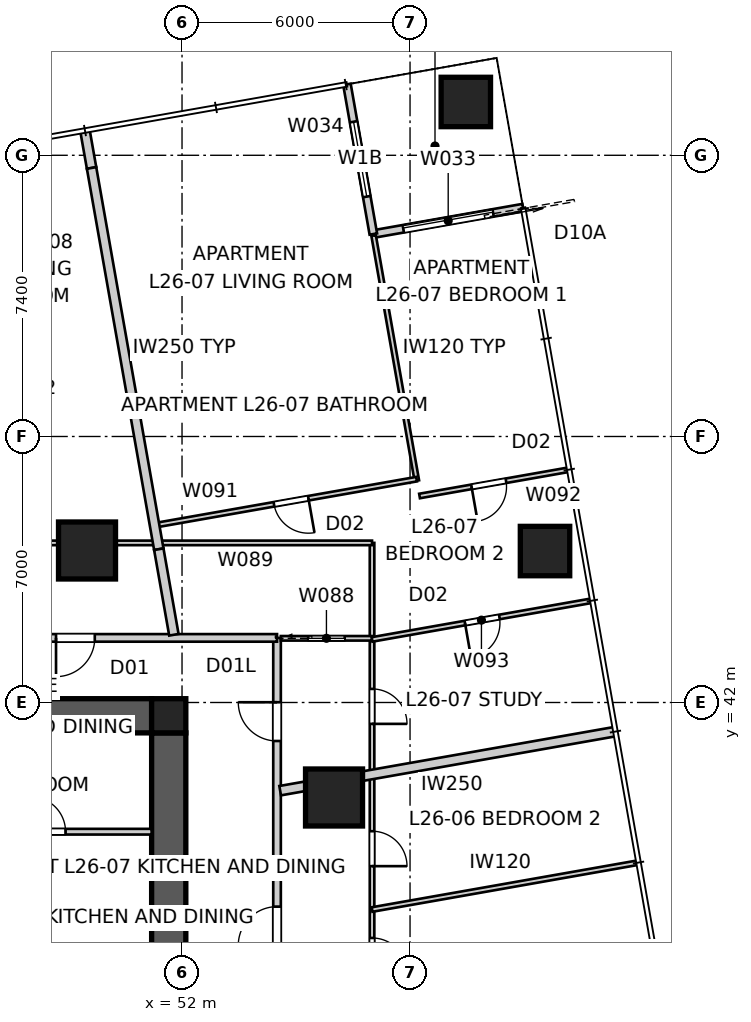
"""IFC4 building model, lengths in metres.
Left out: names, types, materials, properties, quantities, classifications, styles, units other than length and angle.
Written with IfcOpenShell. Run it as: python <this file> out.ifc"""

import sys

from ifc_helpers import new_model, si_unit, direction, frame, frame_2d, origin, origin_2d, place, context, subcontext, project, spatial, polyline, rectangle, outline, extrude, element, fill, save


model = new_model("IFC4")
c1 = context("Model", 3, precision=1e-05, world=origin(), true_north=direction((0.0, 1.0)))
c2 = subcontext(c1, "Body", "Model", "MODEL_VIEW")
j1 = project(units=[si_unit("LENGTHUNIT", "METRE"), si_unit("PLANEANGLEUNIT", "RADIAN")], contexts=[c1])
p1 = place(None, origin())
s1 = spatial("IfcSite", under=j1, at=p1, CompositionType="ELEMENT")
p2 = place(p1, origin())
s2 = spatial("IfcBuilding", under=s1, at=p2, CompositionType="ELEMENT")
p3 = place(p2, frame((0.0, 0.0, 96.4)))
s3 = spatial("IfcBuildingStorey", under=s2, at=p3, CompositionType="ELEMENT", Elevation=96.4)
p4 = place(p3, frame((28.8, 41.65, 0.0), z_axis=(0.0, 0.0, 1.0), x_axis=(1.0, 0.0, 0.0)))
e1 = element("IfcWall", 1, at=p4, inside=s3, PredefinedType="SHEAR", context=c2, shape_type="SweptSolid", body=[
    extrude(outline(polyline([(0.0, -0.45), (22.4, -0.45), (22.4, -0.025), (22.85, -0.025), (22.85, 0.025), (22.4, 0.025), (22.4, 0.45), (0.0, 0.45), (0.0, 0.025), (-0.45, 0.025), (-0.45, -0.025), (0.0, -0.025), (0.0, -0.45)])), origin(), (0.0, 0.0, 1.0), 3.4),
])
p5 = place(p3, frame((51.65, 18.8, 0.0), z_axis=(0.0, 0.0, 1.0), x_axis=(0.0, 1.0, 0.0)))
e2 = element("IfcWall", 2, at=p5, inside=s3, PredefinedType="SHEAR", context=c2, shape_type="SweptSolid", body=[
    extrude(outline(polyline([(0.0, -0.45), (22.4, -0.45), (22.4, -0.025), (22.85, -0.025), (22.85, 0.025), (22.4, 0.025), (22.4, 0.45), (0.0, 0.45), (0.0, 0.025), (-0.45, 0.025), (-0.45, -0.025), (0.0, -0.025), (0.0, -0.45)])), origin(), (0.0, 0.0, 1.0), 3.4),
])
p6 = place(p5, frame((11.14, 0.0, 0.0)))
e3 = element("IfcOpeningElement", 3, at=p6, cuts=e2, PredefinedType="OPENING", context=c2, shape_type="SweptSolid", body=[
    extrude(rectangle(XDim=1.02, YDim=2.4, at=frame_2d((0.51, 1.2))), frame((0.0, 0.46, 0.0), z_axis=(0.0, -1.0, 0.0), x_axis=(1.0, 0.0, 0.0)), (0.0, 0.0, 1.0), 0.92),
])
p7 = place(p3, frame((51.65, 41.65, 0.0), z_axis=(0.0, 0.0, 1.0), x_axis=(1.0, 0.0, 0.0)))
e4 = element("IfcColumn", 4, at=p7, inside=s3, PredefinedType="COLUMN", context=c2, shape_type="SweptSolid", body=[
    extrude(rectangle(XDim=0.9, YDim=0.9, at=origin_2d()), origin(), (0.0, 0.0, 1.0), 3.4),
])
for number, where, z_axis, x_axis in (
    (5, (61.552, 45.985, 0.0), (0.0, 0.0, 1.0), (1.0, 0.0, 0.0)),
    (6, (59.468, 57.803, 0.0), (0.0, 0.0, 1.0), (1.0, 0.0, 0.0)),
):
    element("IfcColumn", number, at=place(p3, frame(where, z_axis=z_axis, x_axis=x_axis)), inside=s3, PredefinedType="COLUMN", context=c2, shape_type="SweptSolid", body=[
        extrude(rectangle(XDim=1.3, YDim=1.3, at=origin_2d()), origin(), (0.0, 0.0, 1.0), 3.4),
    ])
for number, where, z_axis, x_axis in (
    (7, (56.0, 39.5, 0.0), (0.0, 0.0, 1.0), (1.0, 0.0, 0.0)),
    (8, (49.5, 46.0, 0.0), (0.0, 0.0, 1.0), (1.0, 0.0, 0.0)),
):
    element("IfcColumn", number, at=place(p3, frame(where, z_axis=z_axis, x_axis=x_axis)), inside=s3, PredefinedType="COLUMN", context=c2, shape_type="SweptSolid", body=[
        extrude(rectangle(XDim=1.5, YDim=1.5, at=origin_2d()), origin(), (0.0, 0.0, 1.0), 3.4),
    ])
p8 = place(p3, frame((60.974, 55.022, 0.0), z_axis=(0.0, 0.0, 1.0), x_axis=(-0.984808127031, -0.173646056486, 0.0)))
e9 = element("IfcWall", 9, at=p8, inside=s3, PredefinedType="SOLIDWALL", context=c2, shape_type="SweptSolid", body=[
    extrude(rectangle(XDim=4.0, YDim=0.2, at=frame_2d((2.0, 0.0))), origin(), (0.0, 0.0, 1.0), 3.25),
])
p9 = place(p8, frame((0.8, 0.0, 0.0)))
e10 = element("IfcOpeningElement", 10, at=p9, cuts=e9, PredefinedType="OPENING", context=c2, shape_type="SweptSolid", body=[
    extrude(rectangle(XDim=2.4, YDim=2.1, at=frame_2d((1.2, 1.05))), frame((0.0, 0.11, 0.0), z_axis=(0.0, -1.0, 0.0), x_axis=(1.0, 0.0, 0.0)), (0.0, 0.0, 1.0), 0.22),
])
p10 = place(p3, frame((57.034, 54.328, 0.0), z_axis=(0.0, 0.0, 1.0), x_axis=(-0.173646056486, 0.984808127031, 0.0)))
e11 = element("IfcWall", 11, at=p10, inside=s3, PredefinedType="SOLIDWALL", context=c2, shape_type="SweptSolid", body=[
    extrude(rectangle(XDim=4.0, YDim=0.2, at=frame_2d((2.0, 0.0))), origin(), (0.0, 0.0, 1.0), 3.25),
])
p11 = place(p10, frame((1.0, 0.0, 0.45)))
e12 = element("IfcOpeningElement", 12, at=p11, cuts=e11, PredefinedType="OPENING", context=c2, shape_type="SweptSolid", body=[
    extrude(rectangle(XDim=2.0, YDim=1.8, at=frame_2d((1.0, 0.9))), frame((0.0, 0.11, 0.0), z_axis=(0.0, -1.0, 0.0), x_axis=(1.0, 0.0, 0.0)), (0.0, 0.0, 1.0), 0.22),
])
p12 = place(p3, frame((54.5, 16.3, 0.0), z_axis=(0.0, 0.0, 1.0), x_axis=(0.0, 1.0, 0.0)))
e13 = element("IfcWall", 13, at=p12, inside=s3, PredefinedType="PARTITIONING", context=c2, shape_type="SweptSolid", body=[
    extrude(rectangle(XDim=27.4, YDim=0.2, at=frame_2d((13.7, 0.0))), origin(), (0.0, 0.0, 1.0), 3.25),
])
p13 = place(p12, frame((19.308, 0.0, 0.0)))
e14 = element("IfcOpeningElement", 14, at=p13, cuts=e13, PredefinedType="OPENING", context=c2, shape_type="SweptSolid", body=[
    extrude(rectangle(XDim=1.02, YDim=2.34, at=frame_2d((0.51, 1.17))), frame((0.0, 0.11, 0.0), z_axis=(0.0, -1.0, 0.0), x_axis=(1.0, 0.0, 0.0)), (0.0, 0.0, 1.0), 0.22),
])
p14 = place(p12, frame((24.687, 0.0, 0.0)))
e15 = element("IfcOpeningElement", 15, at=p14, cuts=e13, PredefinedType="OPENING", context=c2, shape_type="SweptSolid", body=[
    extrude(rectangle(XDim=1.02, YDim=2.1, at=frame_2d((0.51, 1.05))), frame((0.0, 0.11, 0.0), z_axis=(0.0, -1.0, 0.0), x_axis=(1.0, 0.0, 0.0)), (0.0, 0.0, 1.0), 0.22),
])
p15 = place(p12, frame((1.622, 0.0, 0.0)))
e16 = element("IfcOpeningElement", 16, at=p15, cuts=e13, PredefinedType="OPENING", context=c2, shape_type="SweptSolid", body=[
    extrude(rectangle(XDim=1.02, YDim=2.1, at=frame_2d((0.51, 1.05))), frame((0.0, 0.11, 0.0), z_axis=(0.0, -1.0, 0.0), x_axis=(1.0, 0.0, 0.0)), (0.0, 0.0, 1.0), 0.22),
])
p16 = place(p3, frame((54.5, 43.7, 0.0), z_axis=(0.0, 0.0, 1.0), x_axis=(-1.0, 0.0, 0.0)))
e17 = element("IfcWall", 17, at=p16, inside=s3, PredefinedType="PARTITIONING", context=c2, shape_type="SweptSolid", body=[
    extrude(rectangle(XDim=29.0, YDim=0.2, at=frame_2d((14.5, 0.0))), origin(), (0.0, 0.0, 1.0), 3.25),
])
p17 = place(p16, frame((11.951, 0.0, 0.0)))
e18 = element("IfcOpeningElement", 18, at=p17, cuts=e17, PredefinedType="OPENING", context=c2, shape_type="SweptSolid", body=[
    extrude(rectangle(XDim=1.02, YDim=2.34, at=frame_2d((0.51, 1.17))), frame((0.0, 0.11, 0.0), z_axis=(0.0, -1.0, 0.0), x_axis=(1.0, 0.0, 0.0)), (0.0, 0.0, 1.0), 0.22),
])
p18 = place(p16, frame((4.795, 0.0, 0.0)))
e19 = element("IfcOpeningElement", 19, at=p18, cuts=e17, PredefinedType="OPENING", context=c2, shape_type="SweptSolid", body=[
    extrude(rectangle(XDim=1.02, YDim=2.34, at=frame_2d((0.51, 1.17))), frame((0.0, 0.11, 0.0), z_axis=(0.0, -1.0, 0.0), x_axis=(1.0, 0.0, 0.0)), (0.0, 0.0, 1.0), 0.22),
])
p19 = place(p3, frame((63.405, 41.235, 0.0), z_axis=(0.0, 0.0, 1.0), x_axis=(-0.984806596137, -0.173654738504, 0.0)))
e20 = element("IfcWall", 20, at=p19, inside=s3, PredefinedType="PARTITIONING", context=c2, shape_type="SweptSolid", body=[
    extrude(rectangle(XDim=8.958, YDim=0.25, at=frame_2d((4.479, 0.0))), origin(), (0.0, 0.0, 1.0), 3.25),
])
p20 = place(p3, frame((49.446, 57.051, 0.0), z_axis=(0.0, 0.0, 1.0), x_axis=(0.173813186416, -0.984778643263, 0.0)))
e21 = element("IfcWall", 21, at=p20, inside=s3, PredefinedType="PARTITIONING", context=c2, shape_type="SweptSolid", body=[
    extrude(rectangle(XDim=1.0, YDim=0.25, at=frame_2d((0.5, 0.0))), origin(), (0.0, 0.0, 1.0), 3.25),
])
p21 = place(p3, frame((49.62, 56.066, 0.0), z_axis=(0.0, 0.0, 1.0), x_axis=(0.173644522411, -0.984808397525, 0.0)))
e22 = element("IfcWall", 22, at=p21, inside=s3, PredefinedType="PARTITIONING", context=c2, shape_type="SweptSolid", body=[
    extrude(rectangle(XDim=10.188, YDim=0.25, at=frame_2d((5.094, 0.0))), origin(), (0.0, 0.0, 1.0), 2.638),
])
p22 = place(p3, frame((51.389, 46.033, 0.0), z_axis=(0.0, 0.0, 1.0), x_axis=(0.173657387043, -0.984806129106, 0.0)))
e23 = element("IfcWall", 23, at=p22, inside=s3, PredefinedType="PARTITIONING", context=c2, shape_type="SweptSolid", body=[
    extrude(rectangle(XDim=2.286, YDim=0.25, at=frame_2d((1.143, 0.0))), origin(), (0.0, 0.0, 1.0), 3.25),
])
p23 = place(p3, frame((45.75, 38.6, 0.0), z_axis=(0.0, 0.0, 1.0), x_axis=(1.0, 0.0, 0.0)))
e24 = element("IfcWall", 24, at=p23, inside=s3, PredefinedType="SOLIDWALL", context=c2, shape_type="SweptSolid", body=[
    extrude(rectangle(XDim=5.45, YDim=0.15, at=frame_2d((2.725, 0.0))), origin(), (0.0, 0.0, 1.0), 3.25),
])
p24 = place(p23, frame((2.265, 0.0, 0.0)))
e25 = element("IfcOpeningElement", 25, at=p24, cuts=e24, PredefinedType="OPENING", context=c2, shape_type="SweptSolid", body=[
    extrude(rectangle(XDim=0.92, YDim=2.1, at=frame_2d((0.46, 1.05))), frame((0.0, 0.085, 0.0), z_axis=(0.0, -1.0, 0.0), x_axis=(1.0, 0.0, 0.0)), (0.0, 0.0, 1.0), 0.17),
])
p25 = place(p3, frame((57.0, 46.2, 0.0), z_axis=(0.0, 0.0, 1.0), x_axis=(0.0, -1.0, 0.0)))
e26 = element("IfcWall", 26, at=p25, inside=s3, PredefinedType="PARTITIONING", context=c2, shape_type="SweptSolid", body=[
    extrude(rectangle(XDim=32.4, YDim=0.12, at=frame_2d((16.2, 0.0))), origin(), (0.0, 0.0, 1.0), 2.55),
])
p26 = place(p25, frame((10.396, 0.0, 0.0)))
e27 = element("IfcOpeningElement", 27, at=p26, cuts=e26, PredefinedType="OPENING", context=c2, shape_type="SweptSolid", body=[
    extrude(rectangle(XDim=0.92, YDim=2.34, at=frame_2d((0.46, 1.17))), frame((0.0, 0.07, 0.0), z_axis=(0.0, -1.0, 0.0), x_axis=(1.0, 0.0, 0.0)), (0.0, 0.0, 1.0), 0.14),
])
p27 = place(p25, frame((7.587, 0.0, 0.0)))
e28 = element("IfcOpeningElement", 28, at=p27, cuts=e26, PredefinedType="OPENING", context=c2, shape_type="SweptSolid", body=[
    extrude(rectangle(XDim=0.92, YDim=2.34, at=frame_2d((0.46, 1.17))), frame((0.0, 0.07, 0.0), z_axis=(0.0, -1.0, 0.0), x_axis=(1.0, 0.0, 0.0)), (0.0, 0.0, 1.0), 0.14),
])
p28 = place(p25, frame((3.843, 0.0, 0.0)))
e29 = element("IfcOpeningElement", 29, at=p28, cuts=e26, PredefinedType="OPENING", context=c2, shape_type="SweptSolid", body=[
    extrude(rectangle(XDim=0.92, YDim=2.34, at=frame_2d((0.46, 1.17))), frame((0.0, 0.07, 0.0), z_axis=(0.0, -1.0, 0.0), x_axis=(1.0, 0.0, 0.0)), (0.0, 0.0, 1.0), 0.14),
])
p29 = place(p25, frame((27.988, 0.0, 0.0)))
e30 = element("IfcOpeningElement", 30, at=p29, cuts=e26, PredefinedType="OPENING", context=c2, shape_type="SweptSolid", body=[
    extrude(rectangle(XDim=0.92, YDim=2.34, at=frame_2d((0.46, 1.17))), frame((0.0, 0.07, 0.0), z_axis=(0.0, -1.0, 0.0), x_axis=(1.0, 0.0, 0.0)), (0.0, 0.0, 1.0), 0.14),
])
p30 = place(p25, frame((23.957, 0.0, 0.0)))
e31 = element("IfcOpeningElement", 31, at=p30, cuts=e26, PredefinedType="OPENING", context=c2, shape_type="SweptSolid", body=[
    extrude(rectangle(XDim=0.96, YDim=2.1, at=frame_2d((0.48, 1.05))), frame((0.0, 0.07, 0.0), z_axis=(0.0, -1.0, 0.0), x_axis=(1.0, 0.0, 0.0)), (0.0, 0.0, 1.0), 0.14),
])
p31 = place(p25, frame((21.108, 0.0, 0.0)))
e32 = element("IfcOpeningElement", 32, at=p31, cuts=e26, PredefinedType="OPENING", context=c2, shape_type="SweptSolid", body=[
    extrude(rectangle(XDim=0.96, YDim=2.1, at=frame_2d((0.48, 1.05))), frame((0.0, 0.07, 0.0), z_axis=(0.0, -1.0, 0.0), x_axis=(1.0, 0.0, 0.0)), (0.0, 0.0, 1.0), 0.14),
])
p32 = place(p3, frame((57.0, 36.552, 0.0), z_axis=(0.0, 0.0, 1.0), x_axis=(0.984809234282, 0.173639776761, 0.0)))
e33 = element("IfcWall", 33, at=p32, inside=s3, PredefinedType="PARTITIONING", context=c2, shape_type="SweptSolid", body=[
    extrude(rectangle(XDim=7.081, YDim=0.12, at=frame_2d((3.541, 0.0))), origin(), (0.0, 0.0, 1.0), 3.25),
])
p33 = place(p3, frame((54.6, 43.689, 0.0), z_axis=(0.0, 0.0, 1.0), x_axis=(1.0, 0.0, 0.0)))
e34 = element("IfcWall", 34, at=p33, inside=s3, PredefinedType="PARTITIONING", context=c2, shape_type="SweptSolid", body=[
    extrude(rectangle(XDim=2.4, YDim=0.12, at=frame_2d((1.2, 0.0))), origin(), (0.0, 0.0, 1.0), 3.25),
])
p34 = place(p33, frame((0.72, 0.0, 0.0)))
e35 = element("IfcOpeningElement", 35, at=p34, cuts=e34, PredefinedType="OPENING", context=c2, shape_type="SweptSolid", body=[
    extrude(rectangle(XDim=0.96, YDim=2.1, at=frame_2d((0.48, 1.05))), frame((0.0, 0.07, 0.0), z_axis=(0.0, -1.0, 0.0), x_axis=(1.0, 0.0, 0.0)), (0.0, 0.0, 1.0), 0.14),
])
p35 = place(p3, frame((23.0, 46.2, 0.0), z_axis=(0.0, 0.0, 1.0), x_axis=(1.0, 0.0, 0.0)))
e36 = element("IfcWall", 36, at=p35, inside=s3, PredefinedType="PARTITIONING", context=c2, shape_type="SweptSolid", body=[
    extrude(rectangle(XDim=34.0, YDim=0.12, at=frame_2d((17.0, 0.0))), origin(), (0.0, 0.0, 1.0), 2.55),
])
p36 = place(p35, frame((18.989, 0.0, 0.0)))
e37 = element("IfcOpeningElement", 37, at=p36, cuts=e36, PredefinedType="OPENING", context=c2, shape_type="SweptSolid", body=[
    extrude(rectangle(XDim=0.92, YDim=2.34, at=frame_2d((0.46, 1.17))), frame((0.0, 0.07, 0.0), z_axis=(0.0, -1.0, 0.0), x_axis=(1.0, 0.0, 0.0)), (0.0, 0.0, 1.0), 0.14),
])
p37 = place(p35, frame((1.306, 0.0, 0.0)))
e38 = element("IfcOpeningElement", 38, at=p37, cuts=e36, PredefinedType="OPENING", context=c2, shape_type="SweptSolid", body=[
    extrude(rectangle(XDim=0.92, YDim=2.34, at=frame_2d((0.46, 1.17))), frame((0.0, 0.07, 0.0), z_axis=(0.0, -1.0, 0.0), x_axis=(1.0, 0.0, 0.0)), (0.0, 0.0, 1.0), 0.14),
])
p38 = place(p35, frame((13.884, 0.0, 0.0)))
e39 = element("IfcOpeningElement", 39, at=p38, cuts=e36, PredefinedType="OPENING", context=c2, shape_type="SweptSolid", body=[
    extrude(rectangle(XDim=0.96, YDim=2.1, at=frame_2d((0.48, 1.05))), frame((0.0, 0.07, 0.0), z_axis=(0.0, -1.0, 0.0), x_axis=(1.0, 0.0, 0.0)), (0.0, 0.0, 1.0), 0.14),
])
p39 = place(p35, frame((21.929, 0.0, 0.0)))
e40 = element("IfcOpeningElement", 40, at=p39, cuts=e36, PredefinedType="OPENING", context=c2, shape_type="SweptSolid", body=[
    extrude(rectangle(XDim=0.96, YDim=2.1, at=frame_2d((0.48, 1.05))), frame((0.0, 0.07, 0.0), z_axis=(0.0, -1.0, 0.0), x_axis=(1.0, 0.0, 0.0)), (0.0, 0.0, 1.0), 0.14),
])
p40 = place(p3, frame((57.041, 54.288, 0.0), z_axis=(0.0, 0.0, 1.0), x_axis=(0.173657751636, -0.984806064815, 0.0)))
e41 = element("IfcWall", 41, at=p40, inside=s3, PredefinedType="PARTITIONING", context=c2, shape_type="SweptSolid", body=[
    extrude(rectangle(XDim=6.55, YDim=0.12, at=frame_2d((3.275, 0.0))), origin(), (0.0, 0.0, 1.0), 3.25),
])
p41 = place(p3, frame((58.172, 47.877, 0.0), z_axis=(0.0, 0.0, 1.0), x_axis=(-0.984806372973, -0.173656004074, 0.0)))
e42 = element("IfcWall", 42, at=p41, inside=s3, PredefinedType="PARTITIONING", context=c2, shape_type="SweptSolid", body=[
    extrude(rectangle(XDim=7.0, YDim=0.12, at=frame_2d((3.5, 0.0))), origin(), (0.0, 0.0, 1.0), 3.25),
])
p42 = place(p41, frame((2.89, 0.0, 0.0)))
e43 = element("IfcOpeningElement", 43, at=p42, cuts=e42, PredefinedType="OPENING", context=c2, shape_type="SweptSolid", body=[
    extrude(rectangle(XDim=0.92, YDim=2.34, at=frame_2d((0.46, 1.17))), frame((0.0, 0.07, 0.0), z_axis=(0.0, -1.0, 0.0), x_axis=(1.0, 0.0, 0.0)), (0.0, 0.0, 1.0), 0.14),
])
p43 = place(p3, frame((62.15, 48.122, 0.0), z_axis=(0.0, 0.0, 1.0), x_axis=(-0.984804033163, -0.173669272657, 0.0)))
e44 = element("IfcWall", 44, at=p43, inside=s3, PredefinedType="PARTITIONING", context=c2, shape_type="SweptSolid", body=[
    extrude(rectangle(XDim=3.96, YDim=0.12, at=frame_2d((1.98, 0.0))), origin(), (0.0, 0.0, 1.0), 2.638),
])
p44 = place(p43, frame((1.65, 0.0, 0.0)))
e45 = element("IfcOpeningElement", 45, at=p44, cuts=e44, PredefinedType="OPENING", context=c2, shape_type="SweptSolid", body=[
    extrude(rectangle(XDim=0.92, YDim=2.34, at=frame_2d((0.46, 1.17))), frame((0.0, 0.07, 0.0), z_axis=(0.0, -1.0, 0.0), x_axis=(1.0, 0.0, 0.0)), (0.0, 0.0, 1.0), 0.14),
])
p45 = place(p3, frame((62.758, 44.675, 0.0), z_axis=(0.0, 0.0, 1.0), x_axis=(-0.984810032319, -0.173635250578, 0.0)))
e46 = element("IfcWall", 46, at=p45, inside=s3, PredefinedType="PARTITIONING", context=c2, shape_type="SweptSolid", body=[
    extrude(rectangle(XDim=5.846, YDim=0.12, at=frame_2d((2.923, 0.0))), origin(), (0.0, 0.0, 1.0), 3.25),
])
p46 = place(p45, frame((2.443, 0.0, 0.0)))
e47 = element("IfcOpeningElement", 47, at=p46, cuts=e46, PredefinedType="OPENING", context=c2, shape_type="SweptSolid", body=[
    extrude(rectangle(XDim=0.92, YDim=2.34, at=frame_2d((0.46, 1.17))), frame((0.0, 0.07, 0.0), z_axis=(0.0, -1.0, 0.0), x_axis=(1.0, 0.0, 0.0)), (0.0, 0.0, 1.0), 0.14),
])
p47 = place(p9, origin())
e48 = element("IfcDoor", 48, at=p47, inside=s3, OperationType="SLIDING_TO_LEFT", PredefinedType="DOOR", context=c2, shape_type="SweptSolid", body=[
    extrude(rectangle(XDim=2.4, YDim=2.1, at=frame_2d((1.2, 1.05))), frame((0.0, 0.025, 0.0), z_axis=(0.0, -1.0, 0.0), x_axis=(1.0, 0.0, 0.0)), (0.0, 0.0, 1.0), 0.05),
])
fill(e10, e48)
p48 = place(p11, origin())
e49 = element("IfcWindow", 49, at=p48, inside=s3, PartitioningType="SINGLE_PANEL", PredefinedType="WINDOW", context=c2, shape_type="SweptSolid", body=[
    extrude(rectangle(XDim=2.0, YDim=1.8, at=frame_2d((1.0, 0.9))), frame((0.0, 0.03, 0.0), z_axis=(0.0, -1.0, 0.0), x_axis=(1.0, 0.0, 0.0)), (0.0, 0.0, 1.0), 0.06),
])
fill(e12, e49)
p49 = place(p13, origin())
e50 = element("IfcDoor", 50, at=p49, inside=s3, OperationType="SINGLE_SWING_LEFT", PredefinedType="DOOR", context=c2, shape_type="SweptSolid", body=[
    extrude(rectangle(XDim=1.02, YDim=2.34, at=frame_2d((0.51, 1.17))), frame((0.0, 0.025, 0.0), z_axis=(0.0, -1.0, 0.0), x_axis=(1.0, 0.0, 0.0)), (0.0, 0.0, 1.0), 0.05),
])
fill(e14, e50)
p50 = place(p18, origin())
e51 = element("IfcDoor", 51, at=p50, inside=s3, OperationType="SINGLE_SWING_RIGHT", PredefinedType="DOOR", context=c2, shape_type="SweptSolid", body=[
    extrude(rectangle(XDim=1.02, YDim=2.34, at=frame_2d((0.51, 1.17))), frame((0.0, 0.025, 0.0), z_axis=(0.0, -1.0, 0.0), x_axis=(1.0, 0.0, 0.0)), (0.0, 0.0, 1.0), 0.05),
])
fill(e19, e51)
p51 = place(p14, origin())
e52 = element("IfcDoor", 52, at=p51, inside=s3, OperationType="SINGLE_SWING_RIGHT", PredefinedType="DOOR", context=c2, shape_type="SweptSolid", body=[
    extrude(rectangle(XDim=1.02, YDim=2.1, at=frame_2d((0.51, 1.05))), frame((0.0, 0.025, 0.0), z_axis=(0.0, -1.0, 0.0), x_axis=(1.0, 0.0, 0.0)), (0.0, 0.0, 1.0), 0.05),
])
fill(e15, e52)
p52 = place(p24, origin())
e53 = element("IfcDoor", 53, at=p52, inside=s3, OperationType="SINGLE_SWING_LEFT", PredefinedType="DOOR", context=c2, shape_type="SweptSolid", body=[
    extrude(rectangle(XDim=0.92, YDim=2.1, at=frame_2d((0.46, 1.05))), frame((0.0, 0.025, 0.0), z_axis=(0.0, -1.0, 0.0), x_axis=(1.0, 0.0, 0.0)), (0.0, 0.0, 1.0), 0.05),
])
fill(e25, e53)
p53 = place(p26, origin())
e54 = element("IfcDoor", 54, at=p53, inside=s3, OperationType="SINGLE_SWING_RIGHT", PredefinedType="DOOR", context=c2, shape_type="SweptSolid", body=[
    extrude(rectangle(XDim=0.92, YDim=2.34, at=frame_2d((0.46, 1.17))), frame((0.0, 0.025, 0.0), z_axis=(0.0, -1.0, 0.0), x_axis=(1.0, 0.0, 0.0)), (0.0, 0.0, 1.0), 0.05),
])
fill(e27, e54)
p54 = place(p27, origin())
e55 = element("IfcDoor", 55, at=p54, inside=s3, OperationType="SINGLE_SWING_RIGHT", PredefinedType="DOOR", context=c2, shape_type="SweptSolid", body=[
    extrude(rectangle(XDim=0.92, YDim=2.34, at=frame_2d((0.46, 1.17))), frame((0.0, 0.025, 0.0), z_axis=(0.0, -1.0, 0.0), x_axis=(1.0, 0.0, 0.0)), (0.0, 0.0, 1.0), 0.05),
])
fill(e28, e55)
p55 = place(p28, origin())
e56 = element("IfcDoor", 56, at=p55, inside=s3, OperationType="SINGLE_SWING_RIGHT", PredefinedType="DOOR", context=c2, shape_type="SweptSolid", body=[
    extrude(rectangle(XDim=0.92, YDim=2.34, at=frame_2d((0.46, 1.17))), frame((0.0, 0.025, 0.0), z_axis=(0.0, -1.0, 0.0), x_axis=(1.0, 0.0, 0.0)), (0.0, 0.0, 1.0), 0.05),
])
fill(e29, e56)
p56 = place(p34, origin())
e57 = element("IfcDoor", 57, at=p56, inside=s3, OperationType="SLIDING_TO_LEFT", PredefinedType="DOOR", context=c2, shape_type="SweptSolid", body=[
    extrude(rectangle(XDim=0.96, YDim=2.1, at=frame_2d((0.48, 1.05))), frame((0.0, 0.025, 0.0), z_axis=(0.0, -1.0, 0.0), x_axis=(1.0, 0.0, 0.0)), (0.0, 0.0, 1.0), 0.05),
])
fill(e35, e57)
p57 = place(p46, origin())
e58 = element("IfcDoor", 58, at=p57, inside=s3, OperationType="SINGLE_SWING_RIGHT", PredefinedType="DOOR", context=c2, shape_type="SweptSolid", body=[
    extrude(rectangle(XDim=0.92, YDim=2.34, at=frame_2d((0.46, 1.17))), frame((0.0, 0.025, 0.0), z_axis=(0.0, -1.0, 0.0), x_axis=(1.0, 0.0, 0.0)), (0.0, 0.0, 1.0), 0.05),
])
fill(e47, e58)
p58 = place(p42, origin())
e59 = element("IfcDoor", 59, at=p58, inside=s3, OperationType="SINGLE_SWING_LEFT", PredefinedType="DOOR", context=c2, shape_type="SweptSolid", body=[
    extrude(rectangle(XDim=0.92, YDim=2.34, at=frame_2d((0.46, 1.17))), frame((0.0, 0.025, 0.0), z_axis=(0.0, -1.0, 0.0), x_axis=(1.0, 0.0, 0.0)), (0.0, 0.0, 1.0), 0.05),
])
fill(e43, e59)
p59 = place(p44, origin())
e60 = element("IfcDoor", 60, at=p59, inside=s3, OperationType="SINGLE_SWING_RIGHT", PredefinedType="DOOR", context=c2, shape_type="SweptSolid", body=[
    extrude(rectangle(XDim=0.92, YDim=2.34, at=frame_2d((0.46, 1.17))), frame((0.0, 0.025, 0.0), z_axis=(0.0, -1.0, 0.0), x_axis=(1.0, 0.0, 0.0)), (0.0, 0.0, 1.0), 0.05),
])
fill(e45, e60)
save(model, sys.argv[1])
